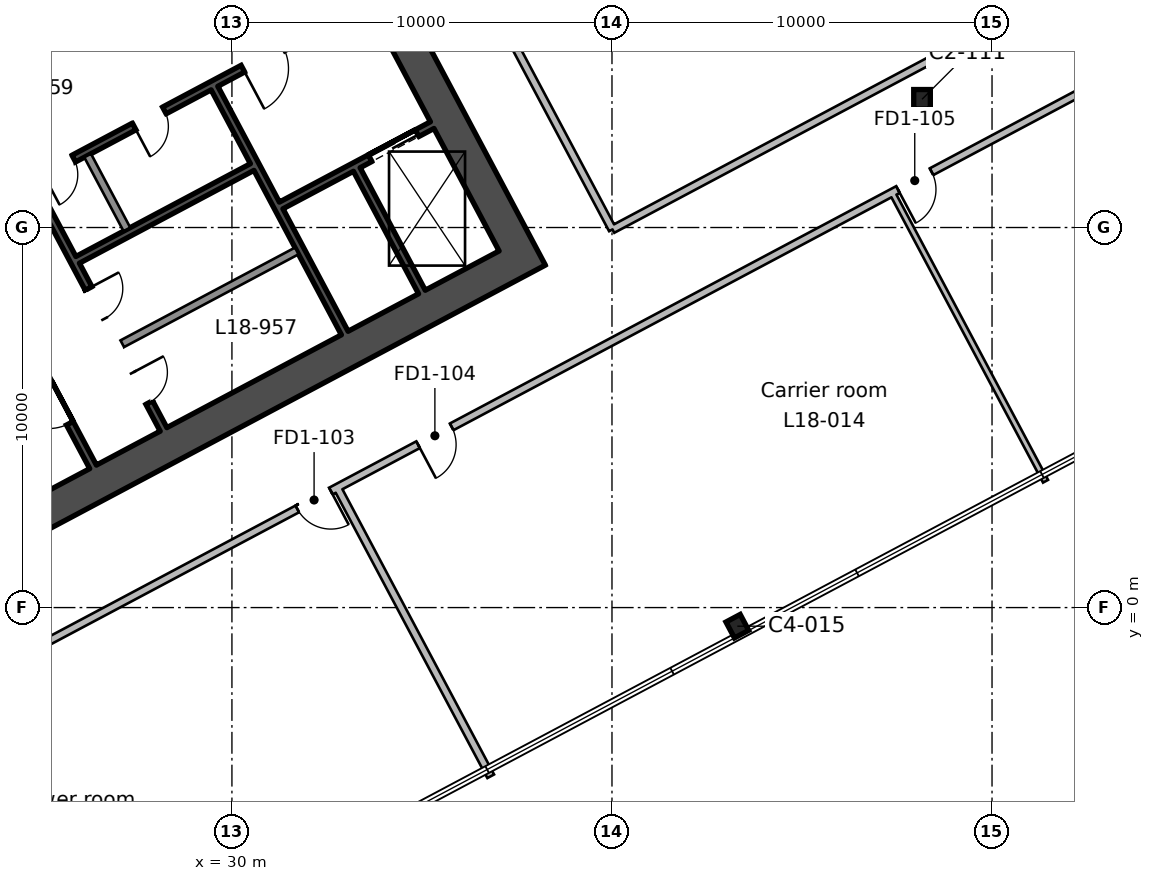
"""IFC4 building model, lengths in metres.
Left out: names, types, materials, properties, quantities, classifications, styles, units other than length and angle.
Written with IfcOpenShell. Run it as: python <this file> out.ifc"""

import sys

from ifc_helpers import new_model, si_unit, direction, frame, frame_2d, origin, origin_2d, place, context, subcontext, project, spatial, rectangle, i_section, extrude, element, fill, save


model = new_model("IFC4")
c1 = context("Model", 3, precision=1e-05, world=origin(), true_north=direction((0.0, 1.0)))
c2 = subcontext(c1, "Body", "Model", "MODEL_VIEW")
j1 = project(units=[si_unit("LENGTHUNIT", "METRE"), si_unit("PLANEANGLEUNIT", "RADIAN")], contexts=[c1])
p1 = place(None, origin())
s1 = spatial("IfcSite", under=j1, at=p1, CompositionType="ELEMENT")
p2 = place(p1, origin())
s2 = spatial("IfcBuilding", under=s1, at=p2, CompositionType="ELEMENT")
p3 = place(p2, frame((0.0, 0.0, 93.8)))
s3 = spatial("IfcBuildingStorey", under=s2, at=p3, CompositionType="ELEMENT", Elevation=93.8)
p4 = place(p3, frame((43.298, -0.49, 0.0), z_axis=(0.0, 0.0, 1.0), x_axis=(0.882947592859, 0.469471562786, 0.0)))
e1 = element("IfcColumn", 1, at=p4, inside=s3, PredefinedType="COLUMN", context=c2, shape_type="SweptSolid", body=[
    extrude(i_section(OverallWidth=0.424, OverallDepth=0.475, WebThickness=0.048, FlangeThickness=0.077, FilletRadius=0.015, at=origin_2d()), origin(), (0.0, 0.0, 1.0), 4.6),
])
p5 = place(p3, frame((48.158, 13.374, 0.0), z_axis=(0.0, 0.0, 1.0), x_axis=(1.0, 0.0, 0.0)))
e2 = element("IfcColumn", 2, at=p5, inside=s3, PredefinedType="COLUMN", context=c2, shape_type="SweptSolid", body=[
    extrude(i_section(OverallWidth=0.437, OverallDepth=0.513, WebThickness=0.061, FlangeThickness=0.097, FilletRadius=0.015, at=origin_2d()), origin(), (0.0, 0.0, 1.0), 4.6),
])
p6 = place(p3, frame((37.849, 8.799, 0.0), z_axis=(0.0, 0.0, 1.0), x_axis=(-0.469465789982, 0.882950662289, 0.0)))
e3 = element("IfcWall", 3, at=p6, inside=s3, PredefinedType="SHEAR", context=c2, shape_type="SweptSolid", body=[
    extrude(rectangle(XDim=20.0, YDim=0.9, at=frame_2d((10.0, 0.0))), origin(), (0.0, 0.0, 1.0), 4.6),
])
p7 = place(p6, frame((10.6, 0.0, 0.0)))
e4 = element("IfcOpeningElement", 4, at=p7, cuts=e3, PredefinedType="OPENING", context=c2, shape_type="SweptSolid", body=[
    extrude(rectangle(XDim=2.4, YDim=2.4, at=frame_2d((1.2, 1.2))), frame((0.0, 0.46, 0.0), z_axis=(0.0, -1.0, 0.0), x_axis=(1.0, 0.0, 0.0)), (0.0, 0.0, 1.0), 0.92),
])
p8 = place(p3, frame((19.405, -0.498, 0.0), z_axis=(0.0, 0.0, 1.0), x_axis=(0.88294509198, 0.469476266226, 0.0)))
e5 = element("IfcWall", 5, at=p8, inside=s3, PredefinedType="SHEAR", context=c2, shape_type="SweptSolid", body=[
    extrude(rectangle(XDim=20.2, YDim=0.9, at=frame_2d((10.1, 0.0))), origin(), (0.0, 0.0, 1.0), 4.6),
])
p9 = place(p3, frame((26.346, 3.702, 0.0), z_axis=(0.0, 0.0, 1.0), x_axis=(-0.469480409012, 0.88294288918, 0.0)))
e6 = element("IfcWall", 6, at=p9, inside=s3, PredefinedType="SHEAR", context=c2, shape_type="SweptSolid", body=[
    extrude(rectangle(XDim=7.3, YDim=0.2, at=frame_2d((3.65, 0.0))), origin(), (0.0, 0.0, 1.0), 4.6),
])
p10 = place(p9, frame((1.3, 0.0, 0.0)))
e7 = element("IfcOpeningElement", 7, at=p10, cuts=e6, PredefinedType="OPENING", context=c2, shape_type="SweptSolid", body=[
    extrude(rectangle(XDim=1.2, YDim=2.1, at=frame_2d((0.6, 1.05))), frame((0.0, 0.11, 0.0), z_axis=(0.0, -1.0, 0.0), x_axis=(1.0, 0.0, 0.0)), (0.0, 0.0, 1.0), 0.22),
])
p11 = place(p3, frame((28.2, 4.688, 0.0), z_axis=(0.0, 0.0, 1.0), x_axis=(-0.469454336211, 0.882956752176, 0.0)))
e8 = element("IfcWall", 8, at=p11, inside=s3, PredefinedType="SHEAR", context=c2, shape_type="SweptSolid", body=[
    extrude(rectangle(XDim=7.3, YDim=0.2, at=frame_2d((3.65, 0.0))), origin(), (0.0, 0.0, 1.0), 4.6),
])
p12 = place(p11, frame((0.8, 0.0, 0.0)))
e9 = element("IfcOpeningElement", 9, at=p12, cuts=e8, PredefinedType="OPENING", context=c2, shape_type="SweptSolid", body=[
    extrude(rectangle(XDim=0.9, YDim=2.1, at=frame_2d((0.45, 1.05))), frame((0.0, 0.11, 0.0), z_axis=(0.0, -1.0, 0.0), x_axis=(1.0, 0.0, 0.0)), (0.0, 0.0, 1.0), 0.22),
])
p13 = place(p11, frame((3.3, 0.0, 0.0)))
e10 = element("IfcOpeningElement", 10, at=p13, cuts=e8, PredefinedType="OPENING", context=c2, shape_type="SweptSolid", body=[
    extrude(rectangle(XDim=0.9, YDim=2.1, at=frame_2d((0.45, 1.05))), frame((0.0, 0.11, 0.0), z_axis=(0.0, -1.0, 0.0), x_axis=(1.0, 0.0, 0.0)), (0.0, 0.0, 1.0), 0.22),
])
p14 = place(p3, frame((27.236, 9.951, 0.0), z_axis=(0.0, 0.0, 1.0), x_axis=(-0.4694473164, 0.882960484464, 0.0)))
e11 = element("IfcWall", 11, at=p14, inside=s3, PredefinedType="SOLIDWALL", context=c2, shape_type="SweptSolid", body=[
    extrude(rectangle(XDim=2.2, YDim=0.2, at=frame_2d((1.1, 0.0))), origin(), (0.0, 0.0, 1.0), 4.6),
])
p15 = place(p3, frame((32.968, 7.223, 0.0), z_axis=(0.0, 0.0, 1.0), x_axis=(-0.469480409012, 0.88294288918, 0.0)))
e12 = element("IfcWall", 12, at=p15, inside=s3, PredefinedType="SHEAR", context=c2, shape_type="SweptSolid", body=[
    extrude(rectangle(XDim=7.3, YDim=0.2, at=frame_2d((3.65, 0.0))), origin(), (0.0, 0.0, 1.0), 4.6),
])
p16 = place(p3, frame((34.999, 8.303, 0.0), z_axis=(0.0, 0.0, 1.0), x_axis=(-0.4694665462, 0.882950260207, 0.0)))
e13 = element("IfcWall", 13, at=p16, inside=s3, PredefinedType="SHEAR", context=c2, shape_type="SweptSolid", body=[
    extrude(rectangle(XDim=3.65, YDim=0.2, at=frame_2d((1.825, 0.0))), origin(), (0.0, 0.0, 1.0), 4.6),
])
p17 = place(p3, frame((27.115, 6.942, 0.0), z_axis=(0.0, 0.0, 1.0), x_axis=(0.882934506056, 0.469496174655, 0.0)))
e14 = element("IfcWall", 14, at=p17, inside=s3, PredefinedType="SOLIDWALL", context=c2, shape_type="SweptSolid", body=[
    extrude(rectangle(XDim=5.2, YDim=0.2, at=frame_2d((2.6, 0.0))), origin(), (0.0, 0.0, 1.0), 4.6),
])
p18 = place(p3, frame((31.296, 10.581, 0.0), z_axis=(0.0, 0.0, 1.0), x_axis=(0.882960433586, 0.469447412093, 0.0)))
e15 = element("IfcWall", 15, at=p18, inside=s3, PredefinedType="SHEAR", context=c2, shape_type="SweptSolid", body=[
    extrude(rectangle(XDim=4.5, YDim=0.2, at=frame_2d((2.25, 0.0))), origin(), (0.0, 0.0, 1.0), 4.6),
])
p19 = place(p18, frame((2.65, 0.0, 0.0)))
e16 = element("IfcOpeningElement", 16, at=p19, cuts=e15, PredefinedType="OPENING", context=c2, shape_type="SweptSolid", body=[
    extrude(rectangle(XDim=1.4, YDim=2.4, at=frame_2d((0.7, 1.2))), frame((0.0, 0.11, 0.0), z_axis=(0.0, -1.0, 0.0), x_axis=(1.0, 0.0, 0.0)), (0.0, 0.0, 1.0), 0.22),
])
p20 = place(p3, frame((25.941, 9.15, 0.0), z_axis=(0.0, 0.0, 1.0), x_axis=(0.882953967957, 0.469459572775, 0.0)))
e17 = element("IfcWall", 17, at=p20, inside=s3, PredefinedType="SHEAR", context=c2, shape_type="SweptSolid", body=[
    extrude(rectangle(XDim=5.2, YDim=0.2, at=frame_2d((2.6, 0.0))), origin(), (0.0, 0.0, 1.0), 4.6),
])
p21 = place(p3, frame((24.726, 11.222, 0.0), z_axis=(0.0, 0.0, 1.0), x_axis=(0.882940221191, 0.469485426614, 0.0)))
e18 = element("IfcWall", 18, at=p21, inside=s3, PredefinedType="SHEAR", context=c2, shape_type="SweptSolid", body=[
    extrude(rectangle(XDim=10.0, YDim=0.2, at=frame_2d((5.0, 0.0))), origin(), (0.0, 0.0, 1.0), 4.6),
])
p22 = place(p21, frame((6.3, 0.0, 0.0)))
e19 = element("IfcOpeningElement", 19, at=p22, cuts=e18, PredefinedType="OPENING", context=c2, shape_type="SweptSolid", body=[
    extrude(rectangle(XDim=1.2, YDim=2.1, at=frame_2d((0.6, 1.05))), frame((0.0, 0.11, 0.0), z_axis=(0.0, -1.0, 0.0), x_axis=(1.0, 0.0, 0.0)), (0.0, 0.0, 1.0), 0.22),
])
p23 = place(p21, frame((0.36, 0.0, 0.0)))
e20 = element("IfcOpeningElement", 20, at=p23, cuts=e18, PredefinedType="OPENING", context=c2, shape_type="SweptSolid", body=[
    extrude(rectangle(XDim=0.9, YDim=2.1, at=frame_2d((0.45, 1.05))), frame((0.0, 0.11, 0.0), z_axis=(0.0, -1.0, 0.0), x_axis=(1.0, 0.0, 0.0)), (0.0, 0.0, 1.0), 0.22),
])
p24 = place(p21, frame((3.06, 0.0, 0.0)))
e21 = element("IfcOpeningElement", 21, at=p24, cuts=e18, PredefinedType="OPENING", context=c2, shape_type="SweptSolid", body=[
    extrude(rectangle(XDim=0.9, YDim=2.1, at=frame_2d((0.45, 1.05))), frame((0.0, 0.11, 0.0), z_axis=(0.0, -1.0, 0.0), x_axis=(1.0, 0.0, 0.0)), (0.0, 0.0, 1.0), 0.22),
])
p25 = place(p3, frame((0.0, 14.27, 0.0), z_axis=(0.0, 0.0, 1.0), x_axis=(0.882946949892, 0.46947277203, 0.0)))
e22 = element("IfcWall", 22, at=p25, inside=s3, PredefinedType="PARTITIONING", context=c2, shape_type="SweptSolid", body=[
    extrude(rectangle(XDim=65.501, YDim=0.2, at=frame_2d((32.75, 0.0))), origin(), (0.0, 0.0, 1.0), 4.2),
])
p26 = place(p25, frame((35.45, 0.0, 0.0)))
e23 = element("IfcOpeningElement", 23, at=p26, cuts=e22, PredefinedType="OPENING", context=c2, shape_type="SweptSolid", body=[
    extrude(rectangle(XDim=1.0, YDim=2.1, at=frame_2d((0.5, 1.05))), frame((0.0, 0.11, 0.0), z_axis=(0.0, -1.0, 0.0), x_axis=(1.0, 0.0, 0.0)), (0.0, 0.0, 1.0), 0.22),
])
p27 = place(p25, frame((32.05, 0.0, 0.0)))
e24 = element("IfcOpeningElement", 24, at=p27, cuts=e22, PredefinedType="OPENING", context=c2, shape_type="SweptSolid", body=[
    extrude(rectangle(XDim=1.0, YDim=2.1, at=frame_2d((0.5, 1.05))), frame((0.0, 0.11, 0.0), z_axis=(0.0, -1.0, 0.0), x_axis=(1.0, 0.0, 0.0)), (0.0, 0.0, 1.0), 0.22),
])
p28 = place(p25, frame((29.65, 0.0, 0.0)))
e25 = element("IfcOpeningElement", 25, at=p28, cuts=e22, PredefinedType="OPENING", context=c2, shape_type="SweptSolid", body=[
    extrude(rectangle(XDim=1.0, YDim=2.1, at=frame_2d((0.5, 1.05))), frame((0.0, 0.11, 0.0), z_axis=(0.0, -1.0, 0.0), x_axis=(1.0, 0.0, 0.0)), (0.0, 0.0, 1.0), 0.22),
])
p29 = place(p25, frame((13.85, 0.0, 0.0)))
e26 = element("IfcOpeningElement", 26, at=p29, cuts=e22, PredefinedType="OPENING", context=c2, shape_type="SweptSolid", body=[
    extrude(rectangle(XDim=1.0, YDim=2.1, at=frame_2d((0.5, 1.05))), frame((0.0, 0.11, 0.0), z_axis=(0.0, -1.0, 0.0), x_axis=(1.0, 0.0, 0.0)), (0.0, 0.0, 1.0), 0.22),
])
p30 = place(p3, frame((57.105, 16.093, 0.0), z_axis=(0.0, 0.0, 1.0), x_axis=(-0.882946553343, -0.469473517827, 0.0)))
e27 = element("IfcWall", 27, at=p30, inside=s3, PredefinedType="PARTITIONING", context=c2, shape_type="SweptSolid", body=[
    extrude(rectangle(XDim=49.272, YDim=0.2, at=frame_2d((24.636, 0.0))), origin(), (0.0, 0.0, 1.0), 4.2),
])
p31 = place(p30, frame((27.75, 0.0, 0.0)))
e28 = element("IfcOpeningElement", 28, at=p31, cuts=e27, PredefinedType="OPENING", context=c2, shape_type="SweptSolid", body=[
    extrude(rectangle(XDim=1.0, YDim=2.1, at=frame_2d((0.5, 1.05))), frame((0.0, 0.11, 0.0), z_axis=(0.0, -1.0, 0.0), x_axis=(1.0, 0.0, 0.0)), (0.0, 0.0, 1.0), 0.22),
])
p32 = place(p30, frame((24.15, 0.0, 0.0)))
e29 = element("IfcOpeningElement", 29, at=p32, cuts=e27, PredefinedType="OPENING", context=c2, shape_type="SweptSolid", body=[
    extrude(rectangle(XDim=1.0, YDim=2.1, at=frame_2d((0.5, 1.05))), frame((0.0, 0.11, 0.0), z_axis=(0.0, -1.0, 0.0), x_axis=(1.0, 0.0, 0.0)), (0.0, 0.0, 1.0), 0.22),
])
p33 = place(p30, frame((9.85, 0.0, 0.0)))
e30 = element("IfcOpeningElement", 30, at=p33, cuts=e27, PredefinedType="OPENING", context=c2, shape_type="SweptSolid", body=[
    extrude(rectangle(XDim=1.0, YDim=2.1, at=frame_2d((0.5, 1.05))), frame((0.0, 0.11, 0.0), z_axis=(0.0, -1.0, 0.0), x_axis=(1.0, 0.0, 0.0)), (0.0, 0.0, 1.0), 0.22),
])
p34 = place(p3, frame((36.809, -4.439, 0.0), z_axis=(0.0, 0.0, 1.0), x_axis=(-0.469409112223, 0.882980795579, 0.0)))
e31 = element("IfcWall", 31, at=p34, inside=s3, PredefinedType="PARTITIONING", context=c2, shape_type="SweptSolid", body=[
    extrude(rectangle(XDim=8.6, YDim=0.2, at=frame_2d((4.3, 0.0))), origin(), (0.0, 0.0, 1.0), 4.2),
])
p35 = place(p3, frame((47.372, 10.918, 0.0), z_axis=(0.0, 0.0, 1.0), x_axis=(0.469298440423, -0.883039621884, 0.0)))
e32 = element("IfcWall", 32, at=p35, inside=s3, PredefinedType="PARTITIONING", context=c2, shape_type="SweptSolid", body=[
    extrude(rectangle(XDim=8.6, YDim=0.15, at=frame_2d((4.3, 0.0))), origin(), (0.0, 0.0, 1.0), 4.2),
])
p36 = place(p3, frame((39.453, 32.303, 0.0), z_axis=(0.0, 0.0, 1.0), x_axis=(0.469461333319, -0.882953031887, 0.0)))
e33 = element("IfcWall", 33, at=p36, inside=s3, PredefinedType="PARTITIONING", context=c2, shape_type="SweptSolid", body=[
    extrude(rectangle(XDim=20.0, YDim=0.2, at=frame_2d((10.0, 0.0))), origin(), (0.0, 0.0, 1.0), 4.2),
])
p37 = place(p3, frame((48.842, 14.644, 0.0), z_axis=(0.0, 0.0, 1.0), x_axis=(-0.882924718888, -0.46951457994, 0.0)))
e34 = element("IfcWall", 34, at=p37, inside=s3, PredefinedType="PARTITIONING", context=c2, shape_type="SweptSolid", body=[
    extrude(rectangle(XDim=10.0, YDim=0.2, at=frame_2d((5.0, 0.0))), origin(), (0.0, 0.0, 1.0), 4.2),
])
p38 = place(p3, frame((40.013, 9.949, 0.0), z_axis=(0.0, 0.0, 1.0), x_axis=(-0.469489882812, 0.882937851685, 0.0)))
e35 = element("IfcWall", 35, at=p38, inside=s3, PredefinedType="PARTITIONING", context=c2, shape_type="SweptSolid", body=[
    extrude(rectangle(XDim=20.0, YDim=0.2, at=frame_2d((10.0, 0.0))), origin(), (0.0, 0.0, 1.0), 4.2),
])
p39 = place(p38, frame((9.55, 0.0, 0.0)))
e36 = element("IfcOpeningElement", 36, at=p39, cuts=e35, PredefinedType="OPENING", context=c2, shape_type="SweptSolid", body=[
    extrude(rectangle(XDim=1.0, YDim=2.1, at=frame_2d((0.5, 1.05))), frame((0.0, 0.11, 0.0), z_axis=(0.0, -1.0, 0.0), x_axis=(1.0, 0.0, 0.0)), (0.0, 0.0, 1.0), 0.22),
])
p40 = place(p22, frame((1.2, 0.0, 0.0), z_axis=(0.0, 0.0, 1.0), x_axis=(-1.0, 0.0, 0.0)))
e37 = element("IfcDoor", 37, at=p40, inside=s3, OperationType="SINGLE_SWING_RIGHT", PredefinedType="DOOR", context=c2, shape_type="SweptSolid", body=[
    extrude(rectangle(XDim=1.2, YDim=2.1, at=frame_2d((0.6, 1.05))), frame((0.0, 0.025, 0.0), z_axis=(0.0, -1.0, 0.0), x_axis=(1.0, 0.0, 0.0)), (0.0, 0.0, 1.0), 0.05),
])
fill(e19, e37)
p41 = place(p10, origin())
e38 = element("IfcDoor", 38, at=p41, inside=s3, OperationType="SINGLE_SWING_RIGHT", PredefinedType="DOOR", context=c2, shape_type="SweptSolid", body=[
    extrude(rectangle(XDim=1.2, YDim=2.1, at=frame_2d((0.6, 1.05))), frame((0.0, 0.025, 0.0), z_axis=(0.0, -1.0, 0.0), x_axis=(1.0, 0.0, 0.0)), (0.0, 0.0, 1.0), 0.05),
])
fill(e7, e38)
p42 = place(p23, frame((0.9, 0.0, 0.0), z_axis=(0.0, 0.0, 1.0), x_axis=(-1.0, 0.0, 0.0)))
e39 = element("IfcDoor", 39, at=p42, inside=s3, OperationType="SINGLE_SWING_RIGHT", PredefinedType="DOOR", context=c2, shape_type="SweptSolid", body=[
    extrude(rectangle(XDim=0.9, YDim=2.1, at=frame_2d((0.45, 1.05))), frame((0.0, 0.025, 0.0), z_axis=(0.0, -1.0, 0.0), x_axis=(1.0, 0.0, 0.0)), (0.0, 0.0, 1.0), 0.05),
])
fill(e20, e39)
p43 = place(p24, frame((0.9, 0.0, 0.0), z_axis=(0.0, 0.0, 1.0), x_axis=(-1.0, 0.0, 0.0)))
e40 = element("IfcDoor", 40, at=p43, inside=s3, OperationType="SINGLE_SWING_RIGHT", PredefinedType="DOOR", context=c2, shape_type="SweptSolid", body=[
    extrude(rectangle(XDim=0.9, YDim=2.1, at=frame_2d((0.45, 1.05))), frame((0.0, 0.025, 0.0), z_axis=(0.0, -1.0, 0.0), x_axis=(1.0, 0.0, 0.0)), (0.0, 0.0, 1.0), 0.05),
])
fill(e21, e40)
p44 = place(p19, origin())
e41 = element("IfcDoor", 41, at=p44, inside=s3, OperationType="DOUBLE_DOOR_SLIDING", PredefinedType="DOOR", context=c2, shape_type="SweptSolid", body=[
    extrude(rectangle(XDim=1.4, YDim=2.4, at=frame_2d((0.7, 1.2))), frame((0.0, 0.025, 0.0), z_axis=(0.0, -1.0, 0.0), x_axis=(1.0, 0.0, 0.0)), (0.0, 0.0, 1.0), 0.05),
])
fill(e16, e41)
p45 = place(p12, frame((0.9, 0.0, 0.0), z_axis=(0.0, 0.0, 1.0), x_axis=(-1.0, 0.0, 0.0)))
e42 = element("IfcDoor", 42, at=p45, inside=s3, OperationType="SINGLE_SWING_LEFT", PredefinedType="DOOR", context=c2, shape_type="SweptSolid", body=[
    extrude(rectangle(XDim=0.9, YDim=2.1, at=frame_2d((0.45, 1.05))), frame((0.0, 0.025, 0.0), z_axis=(0.0, -1.0, 0.0), x_axis=(1.0, 0.0, 0.0)), (0.0, 0.0, 1.0), 0.05),
])
fill(e9, e42)
p46 = place(p13, frame((0.9, 0.0, 0.0), z_axis=(0.0, 0.0, 1.0), x_axis=(-1.0, 0.0, 0.0)))
e43 = element("IfcDoor", 43, at=p46, inside=s3, OperationType="SINGLE_SWING_LEFT", PredefinedType="DOOR", context=c2, shape_type="SweptSolid", body=[
    extrude(rectangle(XDim=0.9, YDim=2.1, at=frame_2d((0.45, 1.05))), frame((0.0, 0.025, 0.0), z_axis=(0.0, -1.0, 0.0), x_axis=(1.0, 0.0, 0.0)), (0.0, 0.0, 1.0), 0.05),
])
fill(e10, e43)
p47 = place(p31, origin())
e44 = element("IfcDoor", 44, at=p47, inside=s3, OperationType="SINGLE_SWING_LEFT", PredefinedType="DOOR", context=c2, shape_type="SweptSolid", body=[
    extrude(rectangle(XDim=1.0, YDim=2.1, at=frame_2d((0.5, 1.05))), frame((0.0, 0.025, 0.0), z_axis=(0.0, -1.0, 0.0), x_axis=(1.0, 0.0, 0.0)), (0.0, 0.0, 1.0), 0.05),
])
fill(e28, e44)
p48 = place(p32, origin())
e45 = element("IfcDoor", 45, at=p48, inside=s3, OperationType="SINGLE_SWING_RIGHT", PredefinedType="DOOR", context=c2, shape_type="SweptSolid", body=[
    extrude(rectangle(XDim=1.0, YDim=2.1, at=frame_2d((0.5, 1.05))), frame((0.0, 0.025, 0.0), z_axis=(0.0, -1.0, 0.0), x_axis=(1.0, 0.0, 0.0)), (0.0, 0.0, 1.0), 0.05),
])
fill(e29, e45)
p49 = place(p33, origin())
e46 = element("IfcDoor", 46, at=p49, inside=s3, OperationType="SINGLE_SWING_RIGHT", PredefinedType="DOOR", context=c2, shape_type="SweptSolid", body=[
    extrude(rectangle(XDim=1.0, YDim=2.1, at=frame_2d((0.5, 1.05))), frame((0.0, 0.025, 0.0), z_axis=(0.0, -1.0, 0.0), x_axis=(1.0, 0.0, 0.0)), (0.0, 0.0, 1.0), 0.05),
])
fill(e30, e46)
save(model, sys.argv[1])
